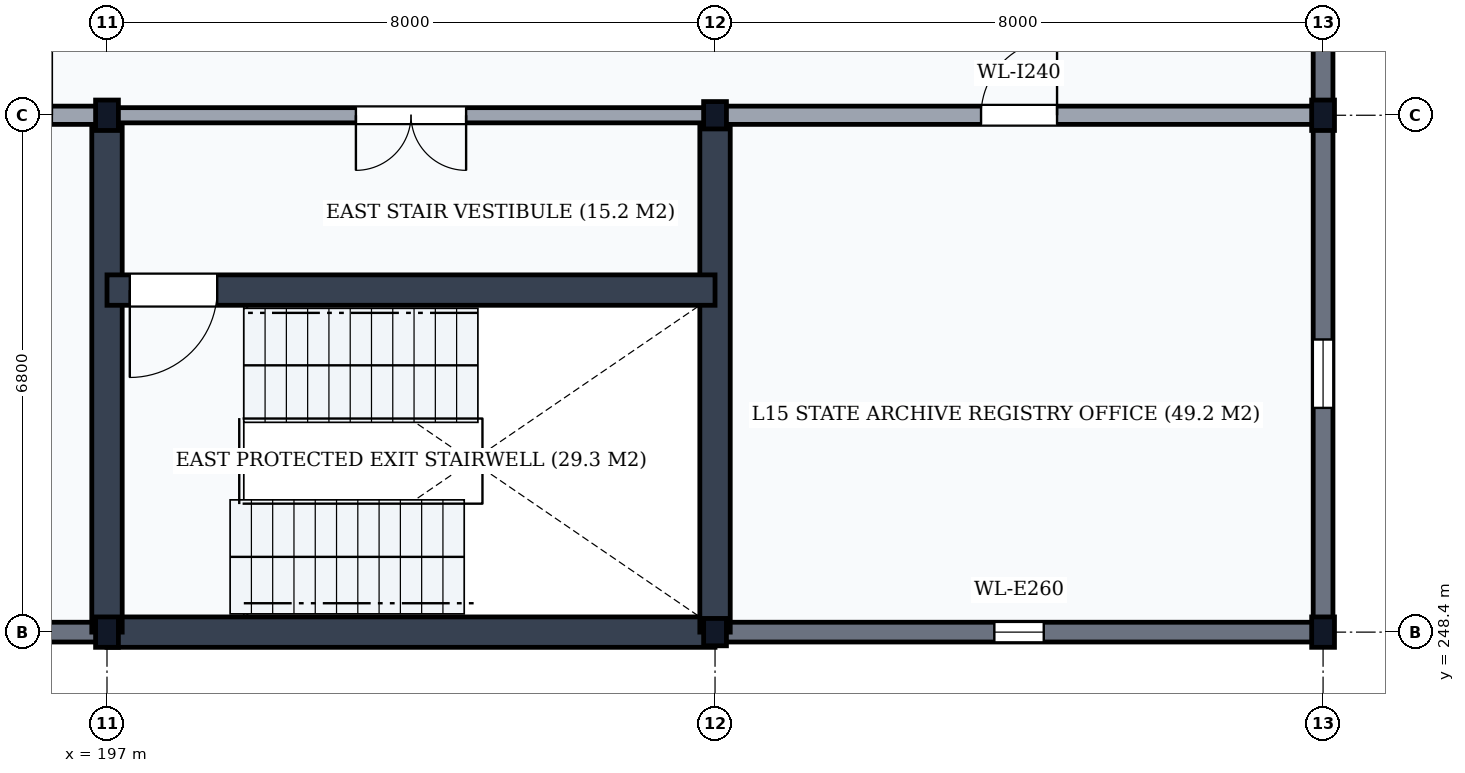
"""IFC4 building model, lengths in metres.
Left out: names, types, materials, properties, quantities, classifications, styles, units other than length and angle.
Written with IfcOpenShell. Run it as: python <this file> out.ifc"""

import sys

from ifc_helpers import new_model, si_unit, direction, frame, frame_2d, origin, origin_2d, place, context, subcontext, project, spatial, rectangle, i_section, extrude, element, fill, save


model = new_model("IFC4")
c1 = context("Model", 3, precision=1e-05, world=origin(), true_north=direction((0.0, 1.0)))
c2 = subcontext(c1, "Body", "Model", "MODEL_VIEW")
j1 = project(units=[si_unit("LENGTHUNIT", "METRE"), si_unit("PLANEANGLEUNIT", "RADIAN")], contexts=[c1])
p1 = place(None, origin())
s1 = spatial("IfcSite", under=j1, at=p1, CompositionType="ELEMENT")
p2 = place(p1, origin())
s2 = spatial("IfcBuilding", under=s1, at=p2, CompositionType="ELEMENT")
p3 = place(p2, frame((0.0, 0.0, 60.0)))
s3 = spatial("IfcBuildingStorey", under=s2, at=p3, CompositionType="ELEMENT", Elevation=60.0)
for number, where, z_axis, x_axis in (
    (1, (197.0, 248.4, 0.0), (0.0, 0.0, 1.0), (1.0, 0.0, 0.0)),
    (2, (197.0, 255.2, 0.0), (0.0, 0.0, 1.0), (1.0, 0.0, 0.0)),
):
    element("IfcColumn", number, at=place(p3, frame(where, z_axis=z_axis, x_axis=x_axis)), inside=s3, PredefinedType="COLUMN", context=c2, shape_type="SweptSolid", body=[
        extrude(i_section(OverallWidth=0.3, OverallDepth=0.4, WebThickness=0.013, FlangeThickness=0.024, FilletRadius=0.027, at=origin_2d()), origin(), (0.0, 0.0, 1.0), 3.9),
    ])
for number, where, z_axis, x_axis in (
    (3, (205.0, 248.4, 0.0), (0.0, 0.0, 1.0), (1.0, 0.0, 0.0)),
    (4, (205.0, 255.2, 0.0), (0.0, 0.0, 1.0), (1.0, 0.0, 0.0)),
):
    element("IfcColumn", number, at=place(p3, frame(where, z_axis=z_axis, x_axis=x_axis)), inside=s3, PredefinedType="COLUMN", context=c2, shape_type="SweptSolid", body=[
        extrude(i_section(OverallWidth=0.3, OverallDepth=0.36, WebThickness=0.012, FlangeThickness=0.022, FilletRadius=0.027, at=origin_2d()), origin(), (0.0, 0.0, 1.0), 3.9),
    ])
for number, where, z_axis, x_axis in (
    (5, (213.0, 248.4, 0.0), (0.0, 0.0, 1.0), (1.0, 0.0, 0.0)),
    (6, (213.0, 255.2, 0.0), (0.0, 0.0, 1.0), (1.0, 0.0, 0.0)),
):
    element("IfcColumn", number, at=place(p3, frame(where, z_axis=z_axis, x_axis=x_axis)), inside=s3, PredefinedType="COLUMN", context=c2, shape_type="SweptSolid", body=[
        extrude(i_section(OverallWidth=0.3, OverallDepth=0.4, WebThickness=0.013, FlangeThickness=0.024, FilletRadius=0.027, at=origin_2d()), origin(), (0.0, 0.0, 1.0), 3.9),
    ])
p4 = place(p3, frame((189.006, 248.4, 0.0), z_axis=(0.0, 0.0, 1.0), x_axis=(1.0, 0.0, 0.0)))
e7 = element("IfcWall", 7, at=p4, inside=s3, PredefinedType="SOLIDWALL", context=c2, shape_type="SweptSolid", body=[
    extrude(rectangle(XDim=7.988, YDim=0.26, at=frame_2d((3.994, 0.0))), origin(), (0.0, 0.0, 1.0), 3.268),
])
p5 = place(p3, frame((205.006, 248.4, 0.0), z_axis=(0.0, 0.0, 1.0), x_axis=(1.0, 0.0, 0.0)))
e8 = element("IfcWall", 8, at=p5, inside=s3, PredefinedType="SOLIDWALL", context=c2, shape_type="SweptSolid", body=[
    extrude(rectangle(XDim=7.988, YDim=0.26, at=frame_2d((3.994, 0.0))), origin(), (0.0, 0.0, 1.0), 3.268),
])
p6 = place(p5, frame((3.669, 0.0, 0.95)))
e9 = element("IfcOpeningElement", 9, at=p6, cuts=e8, PredefinedType="OPENING", context=c2, shape_type="SweptSolid", body=[
    extrude(rectangle(XDim=0.65, YDim=1.8, at=frame_2d((0.325, 0.9))), frame((0.0, 0.145, 0.0), z_axis=(0.0, -1.0, 0.0), x_axis=(1.0, 0.0, 0.0)), (0.0, 0.0, 1.0), 0.29),
])
p7 = place(p3, frame((213.0, 248.406, 0.0), z_axis=(0.0, 0.0, 1.0), x_axis=(0.0, 1.0, 0.0)))
e10 = element("IfcWall", 10, at=p7, inside=s3, PredefinedType="SOLIDWALL", context=c2, shape_type="SweptSolid", body=[
    extrude(rectangle(XDim=6.788, YDim=0.26, at=frame_2d((3.394, 0.0))), origin(), (0.0, 0.0, 1.0), 3.348),
])
p8 = place(p7, frame((2.944, 0.0, 0.95)))
e11 = element("IfcOpeningElement", 11, at=p8, cuts=e10, PredefinedType="OPENING", context=c2, shape_type="SweptSolid", body=[
    extrude(rectangle(XDim=0.9, YDim=2.2, at=frame_2d((0.45, 1.1))), frame((0.0, 0.145, 0.0), z_axis=(0.0, -1.0, 0.0), x_axis=(1.0, 0.0, 0.0)), (0.0, 0.0, 1.0), 0.29),
])
p9 = place(p3, frame((213.0, 255.206, 0.0), z_axis=(0.0, 0.0, 1.0), x_axis=(0.0, 1.0, 0.0)))
e12 = element("IfcWall", 12, at=p9, inside=s3, PredefinedType="SOLIDWALL", context=c2, shape_type="SweptSolid", body=[
    extrude(rectangle(XDim=7.588, YDim=0.26, at=frame_2d((3.794, 0.0))), origin(), (0.0, 0.0, 1.0), 3.308),
])
p10 = place(p3, frame((197.0, 248.4, 0.0), z_axis=(0.0, 0.0, 1.0), x_axis=(1.0, 0.0, 0.0)))
e13 = element("IfcWall", 13, at=p10, inside=s3, PredefinedType="SHEAR", context=c2, shape_type="SweptSolid", body=[
    extrude(rectangle(XDim=8.0, YDim=0.4, at=frame_2d((4.0, 0.0))), origin(), (0.0, 0.0, 1.0), 3.58),
])
for number, where, z_axis, x_axis in (
    (14, (197.0, 248.4, 0.0), (0.0, 0.0, 1.0), (0.0, 1.0, 0.0)),
    (15, (205.0, 248.4, 0.0), (0.0, 0.0, 1.0), (0.0, 1.0, 0.0)),
):
    element("IfcWall", number, at=place(p3, frame(where, z_axis=z_axis, x_axis=x_axis)), inside=s3, PredefinedType="SHEAR", context=c2, shape_type="SweptSolid", body=[
        extrude(rectangle(XDim=6.8, YDim=0.4, at=frame_2d((3.4, 0.0))), origin(), (0.0, 0.0, 1.0), 3.58),
    ])
p11 = place(p3, frame((197.0, 252.9, 0.0), z_axis=(0.0, 0.0, 1.0), x_axis=(1.0, 0.0, 0.0)))
e16 = element("IfcWall", 16, at=p11, inside=s3, PredefinedType="SHEAR", context=c2, shape_type="SweptSolid", body=[
    extrude(rectangle(XDim=8.0, YDim=0.4, at=frame_2d((4.0, 0.0))), origin(), (0.0, 0.0, 1.0), 3.58),
])
p12 = place(p11, frame((0.3, 0.0, 0.0)))
e17 = element("IfcOpeningElement", 17, at=p12, cuts=e16, PredefinedType="OPENING", context=c2, shape_type="SweptSolid", body=[
    extrude(rectangle(XDim=1.15, YDim=2.15, at=frame_2d((0.575, 1.075))), frame((0.0, 0.215, 0.0), z_axis=(0.0, -1.0, 0.0), x_axis=(1.0, 0.0, 0.0)), (0.0, 0.0, 1.0), 0.43),
])
p13 = place(p3, frame((197.0, 255.2, 0.0), z_axis=(0.0, 0.0, 1.0), x_axis=(1.0, 0.0, 0.0)))
e18 = element("IfcWall", 18, at=p13, inside=s3, PredefinedType="PARTITIONING", context=c2, shape_type="SweptSolid", body=[
    extrude(rectangle(XDim=8.0, YDim=0.2, at=frame_2d((4.0, 0.0))), origin(), (0.0, 0.0, 1.0), 3.028),
])
p14 = place(p13, frame((3.275, 0.0, 0.0)))
e19 = element("IfcOpeningElement", 19, at=p14, cuts=e18, PredefinedType="OPENING", context=c2, shape_type="SweptSolid", body=[
    extrude(rectangle(XDim=1.45, YDim=2.2, at=frame_2d((0.725, 1.1))), frame((0.0, 0.115, 0.0), z_axis=(0.0, -1.0, 0.0), x_axis=(1.0, 0.0, 0.0)), (0.0, 0.0, 1.0), 0.23),
])
p15 = place(p3, frame((189.0, 255.2, 0.0), z_axis=(0.0, 0.0, 1.0), x_axis=(1.0, 0.0, 0.0)))
e20 = element("IfcWall", 20, at=p15, inside=s3, PredefinedType="PARTITIONING", context=c2, shape_type="SweptSolid", body=[
    extrude(rectangle(XDim=8.0, YDim=0.24, at=frame_2d((4.0, 0.0))), origin(), (0.0, 0.0, 1.0), 3.028),
])
p16 = place(p15, frame((1.05, 0.0, 0.0)))
e21 = element("IfcOpeningElement", 21, at=p16, cuts=e20, PredefinedType="OPENING", context=c2, shape_type="SweptSolid", body=[
    extrude(rectangle(XDim=1.0, YDim=2.1, at=frame_2d((0.5, 1.05))), frame((0.0, 0.135, 0.0), z_axis=(0.0, -1.0, 0.0), x_axis=(1.0, 0.0, 0.0)), (0.0, 0.0, 1.0), 0.27),
])
p17 = place(p15, frame((3.6, 0.0, 0.0)))
e22 = element("IfcOpeningElement", 22, at=p17, cuts=e20, PredefinedType="OPENING", context=c2, shape_type="SweptSolid", body=[
    extrude(rectangle(XDim=1.5, YDim=2.25, at=frame_2d((0.75, 1.125))), frame((0.0, 0.135, 0.0), z_axis=(0.0, -1.0, 0.0), x_axis=(1.0, 0.0, 0.0)), (0.0, 0.0, 1.0), 0.27),
])
p18 = place(p15, frame((6.425, 0.0, 0.0)))
e23 = element("IfcOpeningElement", 23, at=p18, cuts=e20, PredefinedType="OPENING", context=c2, shape_type="SweptSolid", body=[
    extrude(rectangle(XDim=0.85, YDim=2.1, at=frame_2d((0.425, 1.05))), frame((0.0, 0.135, 0.0), z_axis=(0.0, -1.0, 0.0), x_axis=(1.0, 0.0, 0.0)), (0.0, 0.0, 1.0), 0.27),
])
p19 = place(p3, frame((205.0, 255.2, 0.0), z_axis=(0.0, 0.0, 1.0), x_axis=(1.0, 0.0, 0.0)))
e24 = element("IfcWall", 24, at=p19, inside=s3, PredefinedType="PARTITIONING", context=c2, shape_type="SweptSolid", body=[
    extrude(rectangle(XDim=8.0, YDim=0.24, at=frame_2d((4.0, 0.0))), origin(), (0.0, 0.0, 1.0), 3.028),
])
p20 = place(p19, frame((3.5, 0.0, 0.0)))
e25 = element("IfcOpeningElement", 25, at=p20, cuts=e24, PredefinedType="OPENING", context=c2, shape_type="SweptSolid", body=[
    extrude(rectangle(XDim=1.0, YDim=2.1, at=frame_2d((0.5, 1.05))), frame((0.0, 0.135, 0.0), z_axis=(0.0, -1.0, 0.0), x_axis=(1.0, 0.0, 0.0)), (0.0, 0.0, 1.0), 0.27),
])
p21 = place(p6, origin())
e26 = element("IfcWindow", 26, at=p21, inside=s3, PartitioningType="SINGLE_PANEL", PredefinedType="WINDOW", context=c2, shape_type="SweptSolid", body=[
    extrude(rectangle(XDim=0.65, YDim=1.8, at=frame_2d((0.325, 0.9))), frame((0.0, 0.03, 0.0), z_axis=(0.0, -1.0, 0.0), x_axis=(1.0, 0.0, 0.0)), (0.0, 0.0, 1.0), 0.06),
])
fill(e9, e26)
p22 = place(p8, origin())
e27 = element("IfcWindow", 27, at=p22, inside=s3, PartitioningType="SINGLE_PANEL", PredefinedType="WINDOW", context=c2, shape_type="SweptSolid", body=[
    extrude(rectangle(XDim=0.9, YDim=2.2, at=frame_2d((0.45, 1.1))), frame((0.0, 0.03, 0.0), z_axis=(0.0, -1.0, 0.0), x_axis=(1.0, 0.0, 0.0)), (0.0, 0.0, 1.0), 0.06),
])
fill(e11, e27)
p23 = place(p12, frame((1.15, 0.0, 0.0), z_axis=(0.0, 0.0, 1.0), x_axis=(-1.0, 0.0, 0.0)))
e28 = element("IfcDoor", 28, at=p23, inside=s3, OperationType="SINGLE_SWING_RIGHT", PredefinedType="DOOR", context=c2, shape_type="SweptSolid", body=[
    extrude(rectangle(XDim=1.15, YDim=2.15, at=frame_2d((0.575, 1.075))), frame((0.0, 0.025, 0.0), z_axis=(0.0, -1.0, 0.0), x_axis=(1.0, 0.0, 0.0)), (0.0, 0.0, 1.0), 0.05),
])
fill(e17, e28)
p24 = place(p14, frame((1.45, 0.0, 0.0), z_axis=(0.0, 0.0, 1.0), x_axis=(-1.0, 0.0, 0.0)))
e29 = element("IfcDoor", 29, at=p24, inside=s3, OperationType="DOUBLE_DOOR_SINGLE_SWING", PredefinedType="DOOR", context=c2, shape_type="SweptSolid", body=[
    extrude(rectangle(XDim=1.45, YDim=2.2, at=frame_2d((0.725, 1.1))), frame((0.0, 0.025, 0.0), z_axis=(0.0, -1.0, 0.0), x_axis=(1.0, 0.0, 0.0)), (0.0, 0.0, 1.0), 0.05),
])
fill(e19, e29)
p25 = place(p20, frame((1.0, 0.0, 0.0), z_axis=(0.0, 0.0, 1.0), x_axis=(-1.0, 0.0, 0.0)))
e30 = element("IfcDoor", 30, at=p25, inside=s3, OperationType="SINGLE_SWING_LEFT", PredefinedType="DOOR", context=c2, shape_type="SweptSolid", body=[
    extrude(rectangle(XDim=1.0, YDim=2.1, at=frame_2d((0.5, 1.05))), frame((0.0, 0.025, 0.0), z_axis=(0.0, -1.0, 0.0), x_axis=(1.0, 0.0, 0.0)), (0.0, 0.0, 1.0), 0.05),
])
fill(e25, e30)
save(model, sys.argv[1])
